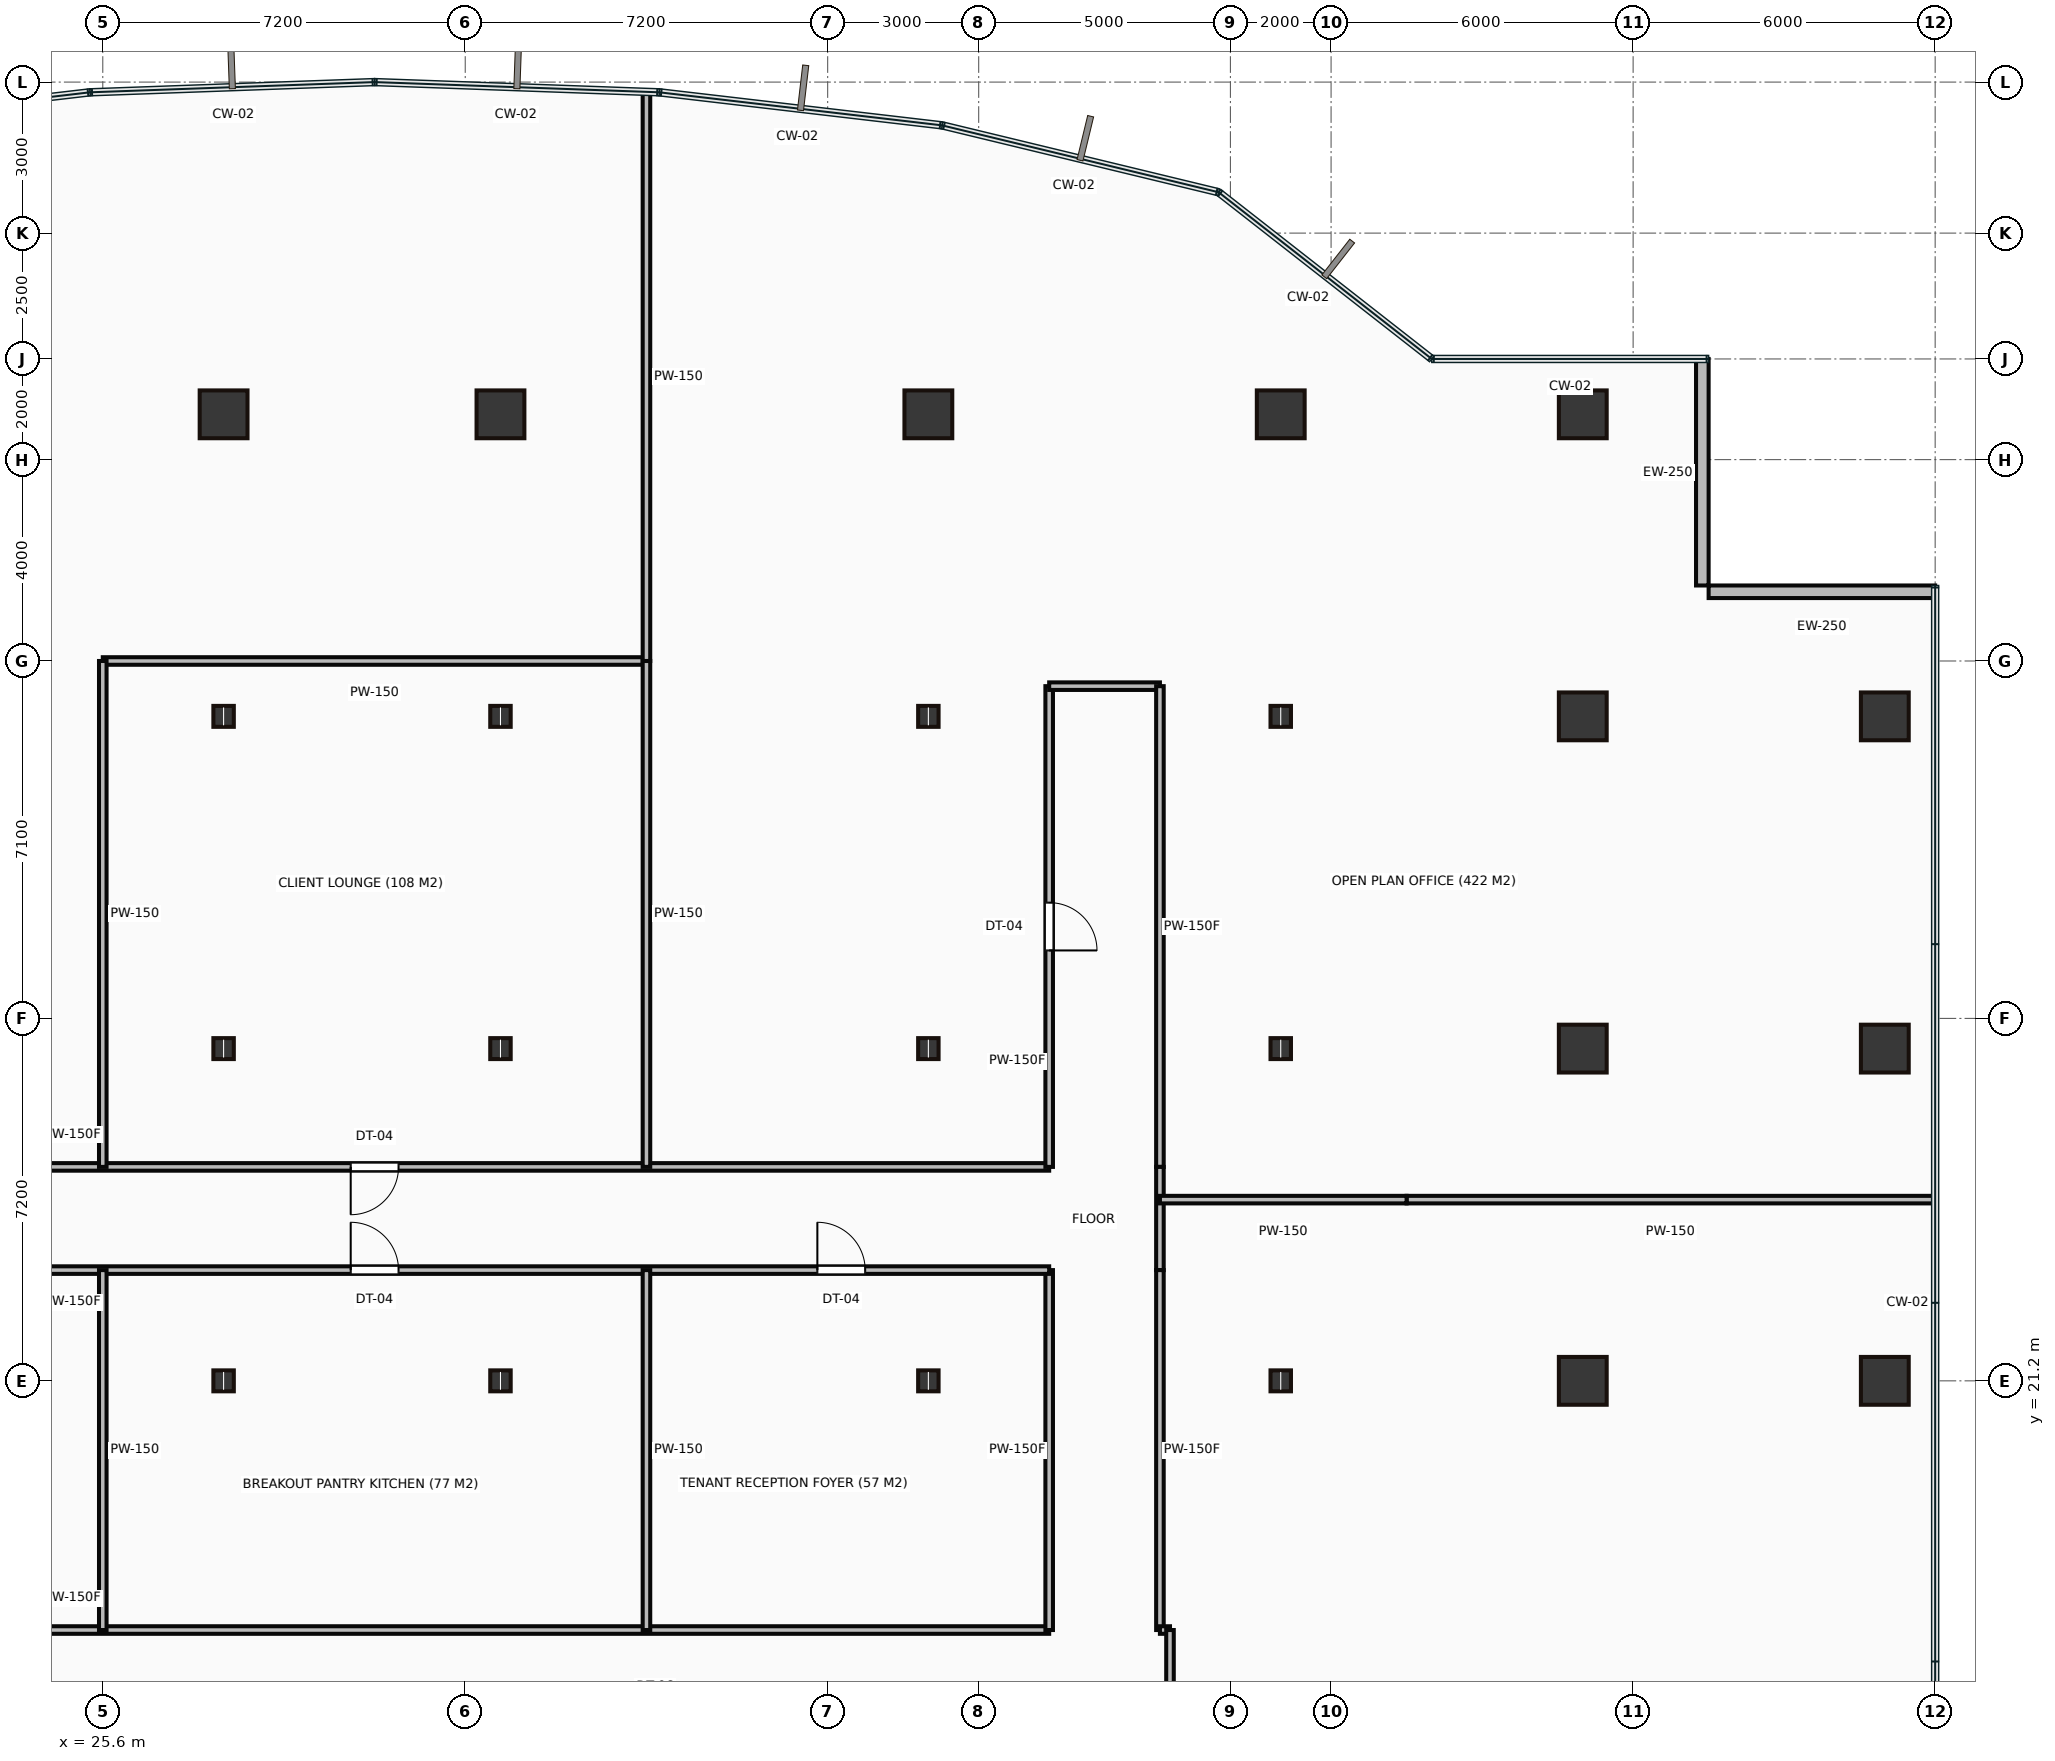
"""IFC4 building model, lengths in metres.
Left out: names, types, materials, properties, quantities, classifications, styles, units other than length and angle.
Written with IfcOpenShell. Run it as: python <this file> out.ifc"""

import sys

from ifc_helpers import new_model, si_unit, direction, frame, frame_2d, origin, origin_2d, place, context, subcontext, project, spatial, rectangle, hollow_rectangle, i_section, extrude, source, transform, mapped, element, fill, save


model = new_model("IFC4")
c1 = context("Model", 3, precision=1e-05, world=origin(), true_north=direction((0.0, 1.0)))
c2 = subcontext(c1, "Body", "Model", "MODEL_VIEW")
j1 = project(units=[si_unit("LENGTHUNIT", "METRE"), si_unit("PLANEANGLEUNIT", "RADIAN")], contexts=[c1])
p1 = place(None, origin())
s1 = spatial("IfcSite", under=j1, at=p1, CompositionType="ELEMENT")
p2 = place(p1, origin())
s2 = spatial("IfcBuilding", under=s1, at=p2, CompositionType="ELEMENT")
p3 = place(p2, frame((0.0, 0.0, 32.5)))
s3 = spatial("IfcBuildingStorey", under=s2, at=p3, CompositionType="ELEMENT", Elevation=32.5)
m1 = source(origin(), c2, "Body", "SweptSolid", [
    extrude(i_section(OverallWidth=0.406, OverallDepth=0.416, WebThickness=0.03, FlangeThickness=0.048, at=origin_2d()), origin(), (0.0, 0.0, 1.0), 3.65),
])
for number, where, z_axis, x_axis in (
    (1, (28.0, 21.2, 0.0), (0.0, 0.0, 1.0), (1.0, 0.0, 0.0)),
    (2, (28.0, 27.8, 0.0), (0.0, 0.0, 1.0), (1.0, 0.0, 0.0)),
    (3, (28.0, 34.4, 0.0), (0.0, 0.0, 1.0), (1.0, 0.0, 0.0)),
):
    element("IfcColumn", number, at=place(p3, frame(where, z_axis=z_axis, x_axis=x_axis)), inside=s3, PredefinedType="COLUMN", context=c2, shape_type="MappedRepresentation", body=[
        mapped(m1, transform((0.0, 0.0, 0.0))),
    ])
m2 = source(origin(), c2, "Body", "SweptSolid", [
    extrude(hollow_rectangle(XDim=0.95, YDim=0.95, WallThickness=0.045, at=origin_2d()), origin(), (0.0, 0.0, 1.0), 3.65),
])
p4 = place(p3, frame((28.0, 40.4, 0.0), z_axis=(0.0, 0.0, 1.0), x_axis=(1.0, 0.0, 0.0)))
e4 = element("IfcColumn", 4, at=p4, inside=s3, PredefinedType="COLUMN", context=c2, shape_type="MappedRepresentation", body=[
    mapped(m2, transform((0.0, 0.0, 0.0))),
])
for number, where, z_axis, x_axis in (
    (5, (33.5, 21.2, 0.0), (0.0, 0.0, 1.0), (1.0, 0.0, 0.0)),
    (6, (33.5, 27.8, 0.0), (0.0, 0.0, 1.0), (1.0, 0.0, 0.0)),
    (7, (33.5, 34.4, 0.0), (0.0, 0.0, 1.0), (1.0, 0.0, 0.0)),
):
    element("IfcColumn", number, at=place(p3, frame(where, z_axis=z_axis, x_axis=x_axis)), inside=s3, PredefinedType="COLUMN", context=c2, shape_type="MappedRepresentation", body=[
        mapped(m1, transform((0.0, 0.0, 0.0))),
    ])
p5 = place(p3, frame((33.5, 40.4, 0.0), z_axis=(0.0, 0.0, 1.0), x_axis=(1.0, 0.0, 0.0)))
e8 = element("IfcColumn", 8, at=p5, inside=s3, PredefinedType="COLUMN", context=c2, shape_type="MappedRepresentation", body=[
    mapped(m2, transform((0.0, 0.0, 0.0))),
])
for number, where, z_axis, x_axis in (
    (9, (42.0, 21.2, 0.0), (0.0, 0.0, 1.0), (1.0, 0.0, 0.0)),
    (10, (42.0, 27.8, 0.0), (0.0, 0.0, 1.0), (1.0, 0.0, 0.0)),
    (11, (42.0, 34.4, 0.0), (0.0, 0.0, 1.0), (1.0, 0.0, 0.0)),
):
    element("IfcColumn", number, at=place(p3, frame(where, z_axis=z_axis, x_axis=x_axis)), inside=s3, PredefinedType="COLUMN", context=c2, shape_type="MappedRepresentation", body=[
        mapped(m1, transform((0.0, 0.0, 0.0))),
    ])
p6 = place(p3, frame((42.0, 40.4, 0.0), z_axis=(0.0, 0.0, 1.0), x_axis=(1.0, 0.0, 0.0)))
e12 = element("IfcColumn", 12, at=p6, inside=s3, PredefinedType="COLUMN", context=c2, shape_type="MappedRepresentation", body=[
    mapped(m2, transform((0.0, 0.0, 0.0))),
])
for number, where, z_axis, x_axis in (
    (13, (49.0, 21.2, 0.0), (0.0, 0.0, 1.0), (1.0, 0.0, 0.0)),
    (14, (49.0, 27.8, 0.0), (0.0, 0.0, 1.0), (1.0, 0.0, 0.0)),
    (15, (49.0, 34.4, 0.0), (0.0, 0.0, 1.0), (1.0, 0.0, 0.0)),
):
    element("IfcColumn", number, at=place(p3, frame(where, z_axis=z_axis, x_axis=x_axis)), inside=s3, PredefinedType="COLUMN", context=c2, shape_type="MappedRepresentation", body=[
        mapped(m1, transform((0.0, 0.0, 0.0))),
    ])
for number, where, z_axis, x_axis in (
    (16, (49.0, 40.4, 0.0), (0.0, 0.0, 1.0), (1.0, 0.0, 0.0)),
    (17, (55.0, 21.2, 0.0), (0.0, 0.0, 1.0), (1.0, 0.0, 0.0)),
    (18, (55.0, 27.8, 0.0), (0.0, 0.0, 1.0), (1.0, 0.0, 0.0)),
    (19, (55.0, 34.4, 0.0), (0.0, 0.0, 1.0), (1.0, 0.0, 0.0)),
    (20, (55.0, 40.4, 0.0), (0.0, 0.0, 1.0), (1.0, 0.0, 0.0)),
    (21, (61.0, 21.2, 0.0), (0.0, 0.0, 1.0), (1.0, 0.0, 0.0)),
    (22, (61.0, 27.8, 0.0), (0.0, 0.0, 1.0), (1.0, 0.0, 0.0)),
    (23, (61.0, 34.4, 0.0), (0.0, 0.0, 1.0), (1.0, 0.0, 0.0)),
):
    element("IfcColumn", number, at=place(p3, frame(where, z_axis=z_axis, x_axis=x_axis)), inside=s3, PredefinedType="COLUMN", context=c2, shape_type="MappedRepresentation", body=[
        mapped(m2, transform((0.0, 0.0, 0.0))),
    ])
m3 = source(origin(), c2, "Body", "SweptSolid", [
    extrude(rectangle(XDim=4.5, YDim=0.25, at=frame_2d((2.25, 0.0))), origin(), (0.0, 0.0, 1.0), 3.4),
])
for number, where, z_axis, x_axis in (
    (24, (62.0, 36.875, 0.0), (0.0, 0.0, 1.0), (-1.0, 0.0, 0.0)),
    (25, (57.375, 37.0, 0.0), (0.0, 0.0, 1.0), (0.0, 1.0, 0.0)),
):
    element("IfcWall", number, at=place(p3, frame(where, z_axis=z_axis, x_axis=x_axis)), inside=s3, PredefinedType="STANDARD", context=c2, shape_type="MappedRepresentation", body=[
        mapped(m3, transform((0.0, 0.0, 0.0))),
    ])
m4 = source(origin(), c2, "Body", "SweptSolid", [
    extrude(rectangle(XDim=38.8, YDim=0.15, at=frame_2d((19.4, 0.0))), origin(), (0.0, 0.0, 1.0), 3.4),
])
p7 = place(p3, frame((5.6, 25.45, 0.0), z_axis=(0.0, 0.0, 1.0), x_axis=(1.0, 0.0, 0.0)))
e26 = element("IfcWall", 26, at=p7, inside=s3, PredefinedType="PARTITIONING", context=c2, shape_type="MappedRepresentation", body=[
    mapped(m4, transform((0.0, 0.0, 0.0))),
])
p8 = place(p7, frame((14.125, 0.0, 0.0)))
e27 = element("IfcOpeningElement", 27, at=p8, cuts=e26, PredefinedType="OPENING", context=c2, shape_type="SweptSolid", body=[
    extrude(rectangle(XDim=0.95, YDim=2.15, at=frame_2d((0.475, 1.075))), frame((0.0, 0.085, 0.0), z_axis=(0.0, -1.0, 0.0), x_axis=(1.0, 0.0, 0.0)), (0.0, 0.0, 1.0), 0.17),
])
p9 = place(p7, frame((24.925, 0.0, 0.0)))
e28 = element("IfcOpeningElement", 28, at=p9, cuts=e26, PredefinedType="OPENING", context=c2, shape_type="SweptSolid", body=[
    extrude(rectangle(XDim=0.95, YDim=2.15, at=frame_2d((0.475, 1.075))), frame((0.0, 0.085, 0.0), z_axis=(0.0, -1.0, 0.0), x_axis=(1.0, 0.0, 0.0)), (0.0, 0.0, 1.0), 0.17),
])
m5 = source(origin(), c2, "Body", "SweptSolid", [
    extrude(rectangle(XDim=9.55, YDim=0.15, at=frame_2d((4.775, 0.0))), origin(), (0.0, 0.0, 1.0), 3.4),
])
p10 = place(p3, frame((44.4, 25.45, 0.0), z_axis=(0.0, 0.0, 1.0), x_axis=(0.0, 1.0, 0.0)))
e29 = element("IfcWall", 29, at=p10, inside=s3, PredefinedType="PARTITIONING", context=c2, shape_type="MappedRepresentation", body=[
    mapped(m5, transform((0.0, 0.0, 0.0))),
])
p11 = place(p10, frame((4.3, 0.0, 0.0)))
e30 = element("IfcOpeningElement", 30, at=p11, cuts=e29, PredefinedType="OPENING", context=c2, shape_type="SweptSolid", body=[
    extrude(rectangle(XDim=0.95, YDim=2.15, at=frame_2d((0.475, 1.075))), frame((0.0, 0.085, 0.0), z_axis=(0.0, -1.0, 0.0), x_axis=(1.0, 0.0, 0.0)), (0.0, 0.0, 1.0), 0.17),
])
m6 = source(origin(), c2, "Body", "SweptSolid", [
    extrude(rectangle(XDim=2.2, YDim=0.15, at=frame_2d((1.1, 0.0))), origin(), (0.0, 0.0, 1.0), 3.4),
])
p12 = place(p3, frame((44.4, 35.0, 0.0), z_axis=(0.0, 0.0, 1.0), x_axis=(1.0, 0.0, 0.0)))
e31 = element("IfcWall", 31, at=p12, inside=s3, PredefinedType="PARTITIONING", context=c2, shape_type="MappedRepresentation", body=[
    mapped(m6, transform((0.0, 0.0, 0.0))),
])
p13 = place(p3, frame((46.6, 35.0, 0.0), z_axis=(0.0, 0.0, 1.0), x_axis=(0.0, -1.0, 0.0)))
e32 = element("IfcWall", 32, at=p13, inside=s3, PredefinedType="PARTITIONING", context=c2, shape_type="MappedRepresentation", body=[
    mapped(m5, transform((0.0, 0.0, 0.0))),
])
m7 = source(origin(), c2, "Body", "SweptSolid", [
    extrude(rectangle(XDim=2.05, YDim=0.15, at=frame_2d((1.025, 0.0))), origin(), (0.0, 0.0, 1.0), 3.4),
])
p14 = place(p3, frame((46.6, 25.45, 0.0), z_axis=(0.0, 0.0, 1.0), x_axis=(0.0, -1.0, 0.0)))
e33 = element("IfcWall", 33, at=p14, inside=s3, PredefinedType="PARTITIONING", context=c2, shape_type="MappedRepresentation", body=[
    mapped(m7, transform((0.0, 0.0, 0.0))),
])
m8 = source(origin(), c2, "Body", "SweptSolid", [
    extrude(rectangle(XDim=7.15, YDim=0.15, at=frame_2d((3.575, 0.0))), origin(), (0.0, 0.0, 1.0), 3.4),
])
p15 = place(p3, frame((46.6, 23.4, 0.0), z_axis=(0.0, 0.0, 1.0), x_axis=(0.0, -1.0, 0.0)))
e34 = element("IfcWall", 34, at=p15, inside=s3, PredefinedType="PARTITIONING", context=c2, shape_type="MappedRepresentation", body=[
    mapped(m8, transform((0.0, 0.0, 0.0))),
])
m9 = source(origin(), c2, "Body", "SweptSolid", [
    extrude(rectangle(XDim=0.2, YDim=0.15, at=frame_2d((0.1, 0.0))), origin(), (0.0, 0.0, 1.0), 3.4),
])
p16 = place(p3, frame((46.6, 16.25, 0.0), z_axis=(0.0, 0.0, 1.0), x_axis=(1.0, 0.0, 0.0)))
e35 = element("IfcWall", 35, at=p16, inside=s3, PredefinedType="PARTITIONING", context=c2, shape_type="MappedRepresentation", body=[
    mapped(m9, transform((0.0, 0.0, 0.0))),
])
m10 = source(origin(), c2, "Body", "SweptSolid", [
    extrude(rectangle(XDim=2.25, YDim=0.15, at=frame_2d((1.125, 0.0))), origin(), (0.0, 0.0, 1.0), 3.4),
])
p17 = place(p3, frame((46.8, 16.25, 0.0), z_axis=(0.0, 0.0, 1.0), x_axis=(0.0, -1.0, 0.0)))
e36 = element("IfcWall", 36, at=p17, inside=s3, PredefinedType="PARTITIONING", context=c2, shape_type="MappedRepresentation", body=[
    mapped(m10, transform((0.0, 0.0, 0.0))),
])
p18 = place(p3, frame((5.6, 16.25, 0.0), z_axis=(0.0, 0.0, 1.0), x_axis=(1.0, 0.0, 0.0)))
e37 = element("IfcWall", 37, at=p18, inside=s3, PredefinedType="PARTITIONING", context=c2, shape_type="MappedRepresentation", body=[
    mapped(m4, transform((0.0, 0.0, 0.0))),
])
p19 = place(p18, frame((4.255, 0.0, 0.0)))
e38 = element("IfcOpeningElement", 38, at=p19, cuts=e37, PredefinedType="OPENING", context=c2, shape_type="SweptSolid", body=[
    extrude(rectangle(XDim=0.95, YDim=2.15, at=frame_2d((0.475, 1.075))), frame((0.0, 0.085, 0.0), z_axis=(0.0, -1.0, 0.0), x_axis=(1.0, 0.0, 0.0)), (0.0, 0.0, 1.0), 0.17),
])
p20 = place(p18, frame((14.125, 0.0, 0.0)))
e39 = element("IfcOpeningElement", 39, at=p20, cuts=e37, PredefinedType="OPENING", context=c2, shape_type="SweptSolid", body=[
    extrude(rectangle(XDim=0.95, YDim=2.15, at=frame_2d((0.475, 1.075))), frame((0.0, 0.085, 0.0), z_axis=(0.0, -1.0, 0.0), x_axis=(1.0, 0.0, 0.0)), (0.0, 0.0, 1.0), 0.17),
])
p21 = place(p3, frame((44.4, 16.25, 0.0), z_axis=(0.0, 0.0, 1.0), x_axis=(0.0, 1.0, 0.0)))
e40 = element("IfcWall", 40, at=p21, inside=s3, PredefinedType="PARTITIONING", context=c2, shape_type="MappedRepresentation", body=[
    mapped(m8, transform((0.0, 0.0, 0.0))),
])
m11 = source(origin(), c2, "Body", "SweptSolid", [
    extrude(rectangle(XDim=38.8, YDim=0.15, at=frame_2d((19.4, 0.0))), origin(), (0.0, 0.0, 1.0), 2.978),
])
p22 = place(p3, frame((44.4, 23.4, 0.0), z_axis=(0.0, 0.0, 1.0), x_axis=(-1.0, 0.0, 0.0)))
e41 = element("IfcWall", 41, at=p22, inside=s3, PredefinedType="PARTITIONING", context=c2, shape_type="MappedRepresentation", body=[
    mapped(m11, transform((0.0, 0.0, 0.0))),
])
p23 = place(p22, frame((12.925, 0.0, 0.0)))
e42 = element("IfcOpeningElement", 42, at=p23, cuts=e41, PredefinedType="OPENING", context=c2, shape_type="SweptSolid", body=[
    extrude(rectangle(XDim=0.95, YDim=2.15, at=frame_2d((0.475, 1.075))), frame((0.0, 0.085, 0.0), z_axis=(0.0, -1.0, 0.0), x_axis=(1.0, 0.0, 0.0)), (0.0, 0.0, 1.0), 0.17),
])
p24 = place(p22, frame((3.655, 0.0, 0.0)))
e43 = element("IfcOpeningElement", 43, at=p24, cuts=e41, PredefinedType="OPENING", context=c2, shape_type="SweptSolid", body=[
    extrude(rectangle(XDim=0.95, YDim=2.15, at=frame_2d((0.475, 1.075))), frame((0.0, 0.085, 0.0), z_axis=(0.0, -1.0, 0.0), x_axis=(1.0, 0.0, 0.0)), (0.0, 0.0, 1.0), 0.17),
])
p25 = place(p3, frame((25.6, 23.4, 0.0), z_axis=(0.0, 0.0, 1.0), x_axis=(0.0, -1.0, 0.0)))
e44 = element("IfcWall", 44, at=p25, inside=s3, PredefinedType="PARTITIONING", context=c2, shape_type="MappedRepresentation", body=[
    mapped(m8, transform((0.0, 0.0, 0.0))),
])
m12 = source(origin(), c2, "Body", "SweptSolid", [
    extrude(rectangle(XDim=10.8, YDim=0.15, at=frame_2d((5.4, 0.0))), origin(), (0.0, 0.0, 1.0), 3.4),
])
p26 = place(p3, frame((36.4, 35.5, 0.0), z_axis=(0.0, 0.0, 1.0), x_axis=(-1.0, 0.0, 0.0)))
e45 = element("IfcWall", 45, at=p26, inside=s3, PredefinedType="PARTITIONING", context=c2, shape_type="MappedRepresentation", body=[
    mapped(m12, transform((0.0, 0.0, 0.0))),
])
m13 = source(origin(), c2, "Body", "SweptSolid", [
    extrude(rectangle(XDim=10.05, YDim=0.15, at=frame_2d((5.025, 0.0))), origin(), (0.0, 0.0, 1.0), 3.4),
])
p27 = place(p3, frame((25.6, 35.5, 0.0), z_axis=(0.0, 0.0, 1.0), x_axis=(0.0, -1.0, 0.0)))
e46 = element("IfcWall", 46, at=p27, inside=s3, PredefinedType="PARTITIONING", context=c2, shape_type="MappedRepresentation", body=[
    mapped(m13, transform((0.0, 0.0, 0.0))),
])
p28 = place(p3, frame((36.4, 23.4, 0.0), z_axis=(0.0, 0.0, 1.0), x_axis=(0.0, -1.0, 0.0)))
e47 = element("IfcWall", 47, at=p28, inside=s3, PredefinedType="PARTITIONING", context=c2, shape_type="MappedRepresentation", body=[
    mapped(m8, transform((0.0, 0.0, 0.0))),
])
p29 = place(p3, frame((36.4, 35.5, 0.0), z_axis=(0.0, 0.0, 1.0), x_axis=(0.0, -1.0, 0.0)))
e48 = element("IfcWall", 48, at=p29, inside=s3, PredefinedType="PARTITIONING", context=c2, shape_type="MappedRepresentation", body=[
    mapped(m13, transform((0.0, 0.0, 0.0))),
])
m14 = source(origin(), c2, "Body", "SweptSolid", [
    extrude(rectangle(XDim=11.286, YDim=0.15, at=frame_2d((5.643, 0.0))), origin(), (0.0, 0.0, 1.0), 3.4),
])
p30 = place(p3, frame((36.4, 46.786, 0.0), z_axis=(0.0, 0.0, 1.0), x_axis=(0.0, -1.0, 0.0)))
e49 = element("IfcWall", 49, at=p30, inside=s3, PredefinedType="PARTITIONING", context=c2, shape_type="MappedRepresentation", body=[
    mapped(m14, transform((0.0, 0.0, 0.0))),
])
m15 = source(origin(), c2, "Body", "SweptSolid", [
    extrude(rectangle(XDim=10.48, YDim=0.15, at=frame_2d((5.24, 0.0))), origin(), (0.0, 0.0, 1.0), 3.4),
])
p31 = place(p3, frame((61.98, 24.8, 0.0), z_axis=(0.0, 0.0, 1.0), x_axis=(-1.0, 0.0, 0.0)))
e50 = element("IfcWall", 50, at=p31, inside=s3, PredefinedType="PARTITIONING", context=c2, shape_type="MappedRepresentation", body=[
    mapped(m15, transform((0.0, 0.0, 0.0))),
])
m16 = source(origin(), c2, "Body", "SweptSolid", [
    extrude(rectangle(XDim=4.9, YDim=0.15, at=frame_2d((2.45, 0.0))), origin(), (0.0, 0.0, 1.0), 3.4),
])
p32 = place(p3, frame((51.5, 24.8, 0.0), z_axis=(0.0, 0.0, 1.0), x_axis=(-1.0, 0.0, 0.0)))
e51 = element("IfcWall", 51, at=p32, inside=s3, PredefinedType="PARTITIONING", context=c2, shape_type="MappedRepresentation", body=[
    mapped(m16, transform((0.0, 0.0, 0.0))),
])
m17 = source(origin(), c2, "Body", "SweptSolid", [
    extrude(rectangle(XDim=0.95, YDim=2.15, at=frame_2d((0.475, 1.075))), frame((0.0, 0.025, 0.0), z_axis=(0.0, -1.0, 0.0), x_axis=(1.0, 0.0, 0.0)), (0.0, 0.0, 1.0), 0.05),
])
p33 = place(p23, origin())
e52 = element("IfcDoor", 52, at=p33, inside=s3, OperationType="SINGLE_SWING_RIGHT", PredefinedType="DOOR", context=c2, shape_type="MappedRepresentation", body=[
    mapped(m17, transform((0.0, 0.0, 0.0))),
])
fill(e42, e52)
p34 = place(p9, origin())
e53 = element("IfcDoor", 53, at=p34, inside=s3, OperationType="SINGLE_SWING_LEFT", PredefinedType="DOOR", context=c2, shape_type="MappedRepresentation", body=[
    mapped(m17, transform((0.0, 0.0, 0.0))),
])
fill(e28, e53)
p35 = place(p24, origin())
e54 = element("IfcDoor", 54, at=p35, inside=s3, OperationType="SINGLE_SWING_RIGHT", PredefinedType="DOOR", context=c2, shape_type="MappedRepresentation", body=[
    mapped(m17, transform((0.0, 0.0, 0.0))),
])
fill(e43, e54)
p36 = place(p11, origin())
e55 = element("IfcDoor", 55, at=p36, inside=s3, OperationType="SINGLE_SWING_LEFT", PredefinedType="DOOR", context=c2, shape_type="MappedRepresentation", body=[
    mapped(m17, transform((0.0, 0.0, 0.0))),
])
fill(e30, e55)
save(model, sys.argv[1])
